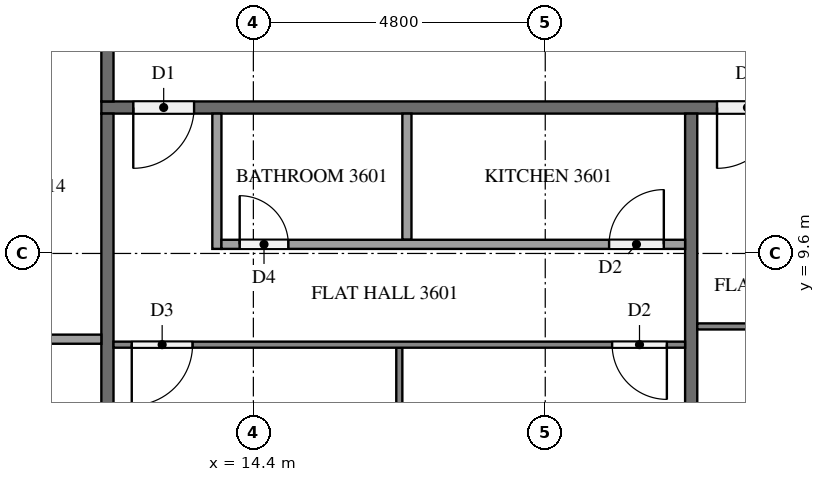
"""IFC4 building model, lengths in metres.
Left out: names, types, materials, properties, quantities, classifications, styles, units other than length and angle.
Written with IfcOpenShell. Run it as: python <this file> out.ifc"""

import sys

from ifc_helpers import new_model, si_unit, direction, frame, frame_2d, origin, place, context, subcontext, project, spatial, rectangle, extrude, element, fill, save


model = new_model("IFC4")
c1 = context("Model", 3, precision=1e-05, world=origin(), true_north=direction((0.0, 1.0)))
c2 = subcontext(c1, "Body", "Model", "MODEL_VIEW")
j1 = project(units=[si_unit("LENGTHUNIT", "METRE"), si_unit("PLANEANGLEUNIT", "RADIAN")], contexts=[c1])
p1 = place(None, origin())
s1 = spatial("IfcSite", under=j1, at=p1, CompositionType="ELEMENT")
p2 = place(p1, origin())
s2 = spatial("IfcBuilding", under=s1, at=p2, CompositionType="ELEMENT")
p3 = place(p2, frame((0.0, 0.0, 140.1)))
s3 = spatial("IfcBuildingStorey", under=s2, at=p3, CompositionType="ELEMENT", Elevation=140.1)
p4 = place(p3, frame((50.5, 12.0, 0.0), z_axis=(0.0, 0.0, 1.0), x_axis=(-1.0, 0.0, 0.0)))
e1 = element("IfcWall", 1, at=p4, inside=s3, PredefinedType="PARTITIONING", context=c2, shape_type="SweptSolid", body=[
    extrude(rectangle(XDim=38.6, YDim=0.2, at=frame_2d((19.3, 0.0))), origin(), (0.0, 0.0, 1.0), 3.1),
])
p5 = place(p4, frame((37.075, 0.0, 0.0)))
e2 = element("IfcOpeningElement", 2, at=p5, cuts=e1, PredefinedType="OPENING", context=c2, shape_type="SweptSolid", body=[
    extrude(rectangle(XDim=1.0, YDim=2.1, at=frame_2d((0.5, 1.05))), frame((0.0, 0.11, 0.0), z_axis=(0.0, -1.0, 0.0), x_axis=(1.0, 0.0, 0.0)), (0.0, 0.0, 1.0), 0.22),
])
p6 = place(p4, frame((27.475, 0.0, 0.0)))
e3 = element("IfcOpeningElement", 3, at=p6, cuts=e1, PredefinedType="OPENING", context=c2, shape_type="SweptSolid", body=[
    extrude(rectangle(XDim=1.0, YDim=2.1, at=frame_2d((0.5, 1.05))), frame((0.0, 0.11, 0.0), z_axis=(0.0, -1.0, 0.0), x_axis=(1.0, 0.0, 0.0)), (0.0, 0.0, 1.0), 0.22),
])
p7 = place(p4, frame((0.525, 0.0, 0.0)))
e4 = element("IfcOpeningElement", 4, at=p7, cuts=e1, PredefinedType="OPENING", context=c2, shape_type="SweptSolid", body=[
    extrude(rectangle(XDim=1.0, YDim=2.1, at=frame_2d((0.5, 1.05))), frame((0.0, 0.11, 0.0), z_axis=(0.0, -1.0, 0.0), x_axis=(1.0, 0.0, 0.0)), (0.0, 0.0, 1.0), 0.22),
])
p8 = place(p3, frame((12.0, 12.1, 0.0), z_axis=(0.0, 0.0, 1.0), x_axis=(0.0, 1.0, 0.0)))
e5 = element("IfcWall", 5, at=p8, inside=s3, PredefinedType="PARTITIONING", context=c2, shape_type="SweptSolid", body=[
    extrude(rectangle(XDim=2.8, YDim=0.2, at=frame_2d((1.4, 0.0))), origin(), (0.0, 0.0, 1.0), 3.1),
])
p9 = place(p8, frame((1.475, 0.0, 0.0)))
e6 = element("IfcOpeningElement", 6, at=p9, cuts=e5, PredefinedType="OPENING", context=c2, shape_type="SweptSolid", body=[
    extrude(rectangle(XDim=1.0, YDim=2.1, at=frame_2d((0.5, 1.05))), frame((0.0, 0.11, 0.0), z_axis=(0.0, -1.0, 0.0), x_axis=(1.0, 0.0, 0.0)), (0.0, 0.0, 1.0), 0.22),
])
for number, where, z_axis, x_axis in (
    (7, (21.6, 11.9, 0.0), (0.0, 0.0, 1.0), (0.0, -1.0, 0.0)),
    (8, (12.0, 4.9, 0.0), (0.0, 0.0, 1.0), (0.0, 1.0, 0.0)),
):
    element("IfcWall", number, at=place(p3, frame(where, z_axis=z_axis, x_axis=x_axis)), inside=s3, PredefinedType="PARTITIONING", context=c2, shape_type="SweptSolid", body=[
        extrude(rectangle(XDim=7.0, YDim=0.2, at=frame_2d((3.5, 0.0))), origin(), (0.0, 0.0, 1.0), 3.1),
    ])
p10 = place(p3, frame((16.8, 8.05, 0.0), z_axis=(0.0, 0.0, 1.0), x_axis=(0.0, -1.0, 0.0)))
e9 = element("IfcWall", 9, at=p10, inside=s3, PredefinedType="PARTITIONING", context=c2, shape_type="SweptSolid", body=[
    extrude(rectangle(XDim=3.15, YDim=0.1, at=frame_2d((1.575, 0.0))), origin(), (0.0, 0.0, 1.0), 3.1),
])
p11 = place(p3, frame((21.5, 8.1, 0.0), z_axis=(0.0, 0.0, 1.0), x_axis=(-1.0, 0.0, 0.0)))
e10 = element("IfcWall", 10, at=p11, inside=s3, PredefinedType="PARTITIONING", context=c2, shape_type="SweptSolid", body=[
    extrude(rectangle(XDim=9.4, YDim=0.1, at=frame_2d((4.7, 0.0))), origin(), (0.0, 0.0, 1.0), 3.1),
])
p12 = place(p11, frame((8.1, 0.0, 0.0)))
e11 = element("IfcOpeningElement", 11, at=p12, cuts=e10, PredefinedType="OPENING", context=c2, shape_type="SweptSolid", body=[
    extrude(rectangle(XDim=1.0, YDim=2.1, at=frame_2d((0.5, 1.05))), frame((0.0, 0.06, 0.0), z_axis=(0.0, -1.0, 0.0), x_axis=(1.0, 0.0, 0.0)), (0.0, 0.0, 1.0), 0.12),
])
p13 = place(p11, frame((0.3, 0.0, 0.0)))
e12 = element("IfcOpeningElement", 12, at=p13, cuts=e10, PredefinedType="OPENING", context=c2, shape_type="SweptSolid", body=[
    extrude(rectangle(XDim=0.9, YDim=2.1, at=frame_2d((0.45, 1.05))), frame((0.0, 0.06, 0.0), z_axis=(0.0, -1.0, 0.0), x_axis=(1.0, 0.0, 0.0)), (0.0, 0.0, 1.0), 0.12),
])
p14 = place(p3, frame((16.925, 11.9, 0.0), z_axis=(0.0, 0.0, 1.0), x_axis=(0.0, -1.0, 0.0)))
e13 = element("IfcWall", 13, at=p14, inside=s3, PredefinedType="PARTITIONING", context=c2, shape_type="SweptSolid", body=[
    extrude(rectangle(XDim=2.075, YDim=0.15, at=frame_2d((1.038, 0.0))), origin(), (0.0, 0.0, 1.0), 3.1),
])
p15 = place(p3, frame((13.8, 11.9, 0.0), z_axis=(0.0, 0.0, 1.0), x_axis=(0.0, -1.0, 0.0)))
e14 = element("IfcWall", 14, at=p15, inside=s3, PredefinedType="PARTITIONING", context=c2, shape_type="SweptSolid", body=[
    extrude(rectangle(XDim=2.225, YDim=0.15, at=frame_2d((1.112, 0.0))), origin(), (0.0, 0.0, 1.0), 3.1),
])
p16 = place(p3, frame((13.875, 9.75, 0.0), z_axis=(0.0, 0.0, 1.0), x_axis=(1.0, 0.0, 0.0)))
e15 = element("IfcWall", 15, at=p16, inside=s3, PredefinedType="PARTITIONING", context=c2, shape_type="SweptSolid", body=[
    extrude(rectangle(XDim=7.625, YDim=0.15, at=frame_2d((3.812, 0.0))), origin(), (0.0, 0.0, 1.0), 3.1),
])
p17 = place(p16, frame((0.3, 0.0, 0.0)))
e16 = element("IfcOpeningElement", 16, at=p17, cuts=e15, PredefinedType="OPENING", context=c2, shape_type="SweptSolid", body=[
    extrude(rectangle(XDim=0.8, YDim=2.1, at=frame_2d((0.4, 1.05))), frame((0.0, 0.085, 0.0), z_axis=(0.0, -1.0, 0.0), x_axis=(1.0, 0.0, 0.0)), (0.0, 0.0, 1.0), 0.17),
])
p18 = place(p16, frame((6.375, 0.0, 0.0)))
e17 = element("IfcOpeningElement", 17, at=p18, cuts=e15, PredefinedType="OPENING", context=c2, shape_type="SweptSolid", body=[
    extrude(rectangle(XDim=0.9, YDim=2.1, at=frame_2d((0.45, 1.05))), frame((0.0, 0.085, 0.0), z_axis=(0.0, -1.0, 0.0), x_axis=(1.0, 0.0, 0.0)), (0.0, 0.0, 1.0), 0.17),
])
p19 = place(p3, frame((38.3, 8.4, 0.0), z_axis=(0.0, 0.0, 1.0), x_axis=(-1.0, 0.0, 0.0)))
e18 = element("IfcWall", 18, at=p19, inside=s3, PredefinedType="PARTITIONING", context=c2, shape_type="SweptSolid", body=[
    extrude(rectangle(XDim=16.6, YDim=0.1, at=frame_2d((8.3, 0.0))), origin(), (0.0, 0.0, 1.0), 3.1),
])
p20 = place(p19, frame((12.25, 0.0, 0.0)))
e19 = element("IfcOpeningElement", 19, at=p20, cuts=e18, PredefinedType="OPENING", context=c2, shape_type="SweptSolid", body=[
    extrude(rectangle(XDim=0.9, YDim=2.1, at=frame_2d((0.45, 1.05))), frame((0.0, 0.06, 0.0), z_axis=(0.0, -1.0, 0.0), x_axis=(1.0, 0.0, 0.0)), (0.0, 0.0, 1.0), 0.12),
])
p21 = place(p19, frame((10.65, 0.0, 0.0)))
e20 = element("IfcOpeningElement", 20, at=p21, cuts=e18, PredefinedType="OPENING", context=c2, shape_type="SweptSolid", body=[
    extrude(rectangle(XDim=0.9, YDim=2.1, at=frame_2d((0.45, 1.05))), frame((0.0, 0.06, 0.0), z_axis=(0.0, -1.0, 0.0), x_axis=(1.0, 0.0, 0.0)), (0.0, 0.0, 1.0), 0.12),
])
p22 = place(p19, frame((0.3, 0.0, 0.0)))
e21 = element("IfcOpeningElement", 21, at=p22, cuts=e18, PredefinedType="OPENING", context=c2, shape_type="SweptSolid", body=[
    extrude(rectangle(XDim=1.0, YDim=2.1, at=frame_2d((0.5, 1.05))), frame((0.0, 0.06, 0.0), z_axis=(0.0, -1.0, 0.0), x_axis=(1.0, 0.0, 0.0)), (0.0, 0.0, 1.0), 0.12),
])
p23 = place(p3, frame((11.9, 8.19, 0.0), z_axis=(0.0, 0.0, 1.0), x_axis=(-1.0, 0.0, 0.0)))
e22 = element("IfcWall", 22, at=p23, inside=s3, PredefinedType="PARTITIONING", context=c2, shape_type="SweptSolid", body=[
    extrude(rectangle(XDim=3.275, YDim=0.15, at=frame_2d((1.637, 0.0))), origin(), (0.0, 0.0, 1.0), 3.1),
])
p24 = place(p5, origin())
e23 = element("IfcDoor", 23, at=p24, inside=s3, OperationType="SINGLE_SWING_RIGHT", PredefinedType="DOOR", context=c2, shape_type="SweptSolid", body=[
    extrude(rectangle(XDim=1.0, YDim=2.1, at=frame_2d((0.5, 1.05))), frame((0.0, 0.025, 0.0), z_axis=(0.0, -1.0, 0.0), x_axis=(1.0, 0.0, 0.0)), (0.0, 0.0, 1.0), 0.05),
])
fill(e2, e23)
p25 = place(p6, origin())
e24 = element("IfcDoor", 24, at=p25, inside=s3, OperationType="SINGLE_SWING_RIGHT", PredefinedType="DOOR", context=c2, shape_type="SweptSolid", body=[
    extrude(rectangle(XDim=1.0, YDim=2.1, at=frame_2d((0.5, 1.05))), frame((0.0, 0.025, 0.0), z_axis=(0.0, -1.0, 0.0), x_axis=(1.0, 0.0, 0.0)), (0.0, 0.0, 1.0), 0.05),
])
fill(e3, e24)
p26 = place(p12, origin())
e25 = element("IfcDoor", 25, at=p26, inside=s3, OperationType="SINGLE_SWING_RIGHT", PredefinedType="DOOR", context=c2, shape_type="SweptSolid", body=[
    extrude(rectangle(XDim=1.0, YDim=2.1, at=frame_2d((0.5, 1.05))), frame((0.0, 0.025, 0.0), z_axis=(0.0, -1.0, 0.0), x_axis=(1.0, 0.0, 0.0)), (0.0, 0.0, 1.0), 0.05),
])
fill(e11, e25)
p27 = place(p13, origin())
e26 = element("IfcDoor", 26, at=p27, inside=s3, OperationType="SINGLE_SWING_LEFT", PredefinedType="DOOR", context=c2, shape_type="SweptSolid", body=[
    extrude(rectangle(XDim=0.9, YDim=2.1, at=frame_2d((0.45, 1.05))), frame((0.0, 0.025, 0.0), z_axis=(0.0, -1.0, 0.0), x_axis=(1.0, 0.0, 0.0)), (0.0, 0.0, 1.0), 0.05),
])
fill(e12, e26)
p28 = place(p17, origin())
e27 = element("IfcDoor", 27, at=p28, inside=s3, OperationType="SINGLE_SWING_LEFT", PredefinedType="DOOR", context=c2, shape_type="SweptSolid", body=[
    extrude(rectangle(XDim=0.8, YDim=2.1, at=frame_2d((0.4, 1.05))), frame((0.0, 0.025, 0.0), z_axis=(0.0, -1.0, 0.0), x_axis=(1.0, 0.0, 0.0)), (0.0, 0.0, 1.0), 0.05),
])
fill(e16, e27)
p29 = place(p18, origin())
e28 = element("IfcDoor", 28, at=p29, inside=s3, OperationType="SINGLE_SWING_RIGHT", PredefinedType="DOOR", context=c2, shape_type="SweptSolid", body=[
    extrude(rectangle(XDim=0.9, YDim=2.1, at=frame_2d((0.45, 1.05))), frame((0.0, 0.025, 0.0), z_axis=(0.0, -1.0, 0.0), x_axis=(1.0, 0.0, 0.0)), (0.0, 0.0, 1.0), 0.05),
])
fill(e17, e28)
save(model, sys.argv[1])
